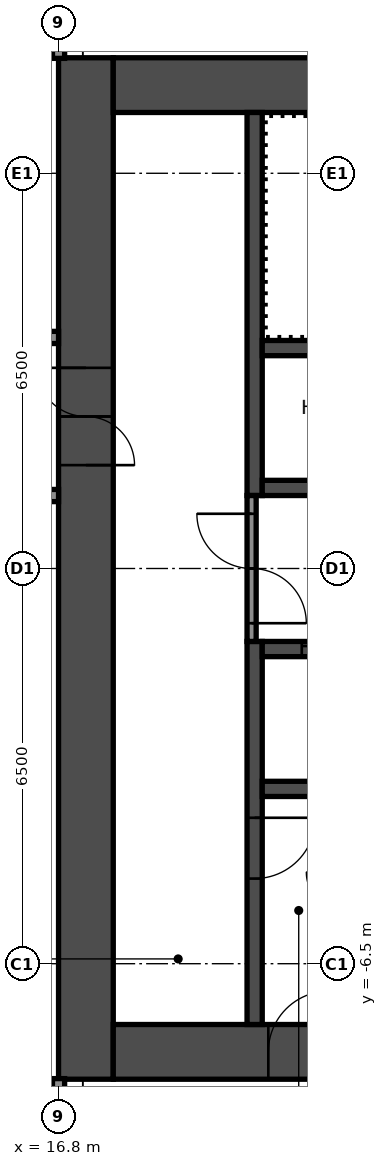
"""IFC4 building model, lengths in metres.
Left out: names, types, materials, properties, quantities, classifications, styles, units other than length and angle.
Written with IfcOpenShell. Run it as: python <this file> out.ifc"""

import sys

from ifc_helpers import new_model, si_unit, direction, frame, frame_2d, origin, place, context, subcontext, project, spatial, rectangle, extrude, element, fill, save


model = new_model("IFC4")
c1 = context("Model", 3, precision=1e-05, world=origin(), true_north=direction((0.0, 1.0)))
c2 = subcontext(c1, "Body", "Model", "MODEL_VIEW")
j1 = project(units=[si_unit("LENGTHUNIT", "METRE"), si_unit("PLANEANGLEUNIT", "RADIAN")], contexts=[c1])
p1 = place(None, origin())
s1 = spatial("IfcSite", under=j1, at=p1, CompositionType="ELEMENT")
p2 = place(p1, origin())
s2 = spatial("IfcBuilding", under=s1, at=p2, CompositionType="ELEMENT")
p3 = place(p2, frame((0.0, 0.0, 175.8)))
s3 = spatial("IfcBuildingStorey", under=s2, at=p3, CompositionType="ELEMENT", Elevation=175.8)
p4 = place(p3, frame((17.25, -8.4, 0.0), z_axis=(0.0, 0.0, 1.0), x_axis=(0.0, 1.0, 0.0)))
e1 = element("IfcWall", 1, at=p4, inside=s3, PredefinedType="SHEAR", context=c2, shape_type="SweptSolid", body=[
    extrude(rectangle(XDim=16.8, YDim=0.9, at=frame_2d((8.4, 0.0))), origin(), (0.0, 0.0, 1.0), 4.1),
])
p5 = place(p4, frame((10.1, 0.0, 0.0)))
e2 = element("IfcOpeningElement", 2, at=p5, cuts=e1, PredefinedType="OPENING", context=c2, shape_type="SweptSolid", body=[
    extrude(rectangle(XDim=1.6, YDim=2.1, at=frame_2d((0.8, 1.05))), frame((0.0, 0.46, 0.0), z_axis=(0.0, -1.0, 0.0), x_axis=(1.0, 0.0, 0.0)), (0.0, 0.0, 1.0), 0.92),
])
p6 = place(p3, frame((17.7, 7.95, 0.0), z_axis=(0.0, 0.0, 1.0), x_axis=(1.0, 0.0, 0.0)))
e3 = element("IfcWall", 3, at=p6, inside=s3, PredefinedType="SHEAR", context=c2, shape_type="SweptSolid", body=[
    extrude(rectangle(XDim=15.0, YDim=0.9, at=frame_2d((7.5, 0.0))), origin(), (0.0, 0.0, 1.0), 4.1),
])
p7 = place(p6, frame((10.4, 0.0, 0.0)))
e4 = element("IfcOpeningElement", 4, at=p7, cuts=e3, PredefinedType="OPENING", context=c2, shape_type="SweptSolid", body=[
    extrude(rectangle(XDim=1.2, YDim=2.1, at=frame_2d((0.6, 1.05))), frame((0.0, 0.46, 0.0), z_axis=(0.0, -1.0, 0.0), x_axis=(1.0, 0.0, 0.0)), (0.0, 0.0, 1.0), 0.92),
])
p8 = place(p6, frame((13.35, 0.0, 0.0)))
e5 = element("IfcOpeningElement", 5, at=p8, cuts=e3, PredefinedType="OPENING", context=c2, shape_type="SweptSolid", body=[
    extrude(rectangle(XDim=0.9, YDim=2.1, at=frame_2d((0.45, 1.05))), frame((0.0, 0.46, 0.0), z_axis=(0.0, -1.0, 0.0), x_axis=(1.0, 0.0, 0.0)), (0.0, 0.0, 1.0), 0.92),
])
p9 = place(p3, frame((17.7, -7.95, 0.0), z_axis=(0.0, 0.0, 1.0), x_axis=(1.0, 0.0, 0.0)))
e6 = element("IfcWall", 6, at=p9, inside=s3, PredefinedType="SHEAR", context=c2, shape_type="SweptSolid", body=[
    extrude(rectangle(XDim=15.0, YDim=0.9, at=frame_2d((7.5, 0.0))), origin(), (0.0, 0.0, 1.0), 4.1),
])
p10 = place(p9, frame((2.55, 0.0, 0.0)))
e7 = element("IfcOpeningElement", 7, at=p10, cuts=e6, PredefinedType="OPENING", context=c2, shape_type="SweptSolid", body=[
    extrude(rectangle(XDim=1.0, YDim=2.1, at=frame_2d((0.5, 1.05))), frame((0.0, 0.46, 0.0), z_axis=(0.0, -1.0, 0.0), x_axis=(1.0, 0.0, 0.0)), (0.0, 0.0, 1.0), 0.92),
])
p11 = place(p3, frame((20.025, 1.2, 0.0), z_axis=(0.0, 0.0, 1.0), x_axis=(0.0, 1.0, 0.0)))
e8 = element("IfcWall", 8, at=p11, inside=s3, PredefinedType="SHEAR", context=c2, shape_type="SweptSolid", body=[
    extrude(rectangle(XDim=6.3, YDim=0.25, at=frame_2d((3.15, 0.0))), origin(), (0.0, 0.0, 1.0), 4.1),
])
p12 = place(p3, frame((20.025, -7.5, 0.0), z_axis=(0.0, 0.0, 1.0), x_axis=(0.0, 1.0, 0.0)))
e9 = element("IfcWall", 9, at=p12, inside=s3, PredefinedType="SHEAR", context=c2, shape_type="SweptSolid", body=[
    extrude(rectangle(XDim=6.3, YDim=0.25, at=frame_2d((3.15, 0.0))), origin(), (0.0, 0.0, 1.0), 4.1),
])
p13 = place(p12, frame((2.4, 0.0, 0.0)))
e10 = element("IfcOpeningElement", 10, at=p13, cuts=e9, PredefinedType="OPENING", context=c2, shape_type="SweptSolid", body=[
    extrude(rectangle(XDim=1.0, YDim=2.1, at=frame_2d((0.5, 1.05))), frame((0.0, 0.135, 0.0), z_axis=(0.0, -1.0, 0.0), x_axis=(1.0, 0.0, 0.0)), (0.0, 0.0, 1.0), 0.27),
])
p14 = place(p3, frame((20.15, 1.325, 0.0), z_axis=(0.0, 0.0, 1.0), x_axis=(1.0, 0.0, 0.0)))
e11 = element("IfcWall", 11, at=p14, inside=s3, PredefinedType="SHEAR", context=c2, shape_type="SweptSolid", body=[
    extrude(rectangle(XDim=7.5, YDim=0.25, at=frame_2d((3.75, 0.0))), origin(), (0.0, 0.0, 1.0), 4.1),
])
p15 = place(p14, frame((2.038, 0.0, 0.0)))
e12 = element("IfcOpeningElement", 12, at=p15, cuts=e11, PredefinedType="OPENING", context=c2, shape_type="SweptSolid", body=[
    extrude(rectangle(XDim=0.9, YDim=2.1, at=frame_2d((0.45, 1.05))), frame((0.0, 0.135, 0.0), z_axis=(0.0, -1.0, 0.0), x_axis=(1.0, 0.0, 0.0)), (0.0, 0.0, 1.0), 0.27),
])
p16 = place(p14, frame((5.738, 0.0, 0.0)))
e13 = element("IfcOpeningElement", 13, at=p16, cuts=e11, PredefinedType="OPENING", context=c2, shape_type="SweptSolid", body=[
    extrude(rectangle(XDim=0.9, YDim=2.1, at=frame_2d((0.45, 1.05))), frame((0.0, 0.135, 0.0), z_axis=(0.0, -1.0, 0.0), x_axis=(1.0, 0.0, 0.0)), (0.0, 0.0, 1.0), 0.27),
])
p17 = place(p3, frame((20.15, 3.625, 0.0), z_axis=(0.0, 0.0, 1.0), x_axis=(1.0, 0.0, 0.0)))
e14 = element("IfcWall", 14, at=p17, inside=s3, PredefinedType="SHEAR", context=c2, shape_type="SweptSolid", body=[
    extrude(rectangle(XDim=7.5, YDim=0.25, at=frame_2d((3.75, 0.0))), origin(), (0.0, 0.0, 1.0), 4.1),
])
p18 = place(p3, frame((20.15, -1.325, 0.0), z_axis=(0.0, 0.0, 1.0), x_axis=(1.0, 0.0, 0.0)))
e15 = element("IfcWall", 15, at=p18, inside=s3, PredefinedType="SHEAR", context=c2, shape_type="SweptSolid", body=[
    extrude(rectangle(XDim=7.5, YDim=0.25, at=frame_2d((3.75, 0.0))), origin(), (0.0, 0.0, 1.0), 4.1),
])
p19 = place(p18, frame((0.65, 0.0, 0.0)))
e16 = element("IfcOpeningElement", 16, at=p19, cuts=e15, PredefinedType="OPENING", context=c2, shape_type="SweptSolid", body=[
    extrude(rectangle(XDim=1.1, YDim=2.1, at=frame_2d((0.55, 1.05))), frame((0.0, 0.135, 0.0), z_axis=(0.0, -1.0, 0.0), x_axis=(1.0, 0.0, 0.0)), (0.0, 0.0, 1.0), 0.27),
])
p20 = place(p18, frame((3.05, 0.0, 0.0)))
e17 = element("IfcOpeningElement", 17, at=p20, cuts=e15, PredefinedType="OPENING", context=c2, shape_type="SweptSolid", body=[
    extrude(rectangle(XDim=1.1, YDim=2.1, at=frame_2d((0.55, 1.05))), frame((0.0, 0.135, 0.0), z_axis=(0.0, -1.0, 0.0), x_axis=(1.0, 0.0, 0.0)), (0.0, 0.0, 1.0), 0.27),
])
p21 = place(p18, frame((5.45, 0.0, 0.0)))
e18 = element("IfcOpeningElement", 18, at=p21, cuts=e15, PredefinedType="OPENING", context=c2, shape_type="SweptSolid", body=[
    extrude(rectangle(XDim=1.1, YDim=2.1, at=frame_2d((0.55, 1.05))), frame((0.0, 0.135, 0.0), z_axis=(0.0, -1.0, 0.0), x_axis=(1.0, 0.0, 0.0)), (0.0, 0.0, 1.0), 0.27),
])
p22 = place(p3, frame((20.15, -3.625, 0.0), z_axis=(0.0, 0.0, 1.0), x_axis=(1.0, 0.0, 0.0)))
e19 = element("IfcWall", 19, at=p22, inside=s3, PredefinedType="SHEAR", context=c2, shape_type="SweptSolid", body=[
    extrude(rectangle(XDim=7.5, YDim=0.25, at=frame_2d((3.75, 0.0))), origin(), (0.0, 0.0, 1.0), 4.1),
])
p23 = place(p3, frame((19.975, -1.2, 0.0), z_axis=(0.0, 0.0, 1.0), x_axis=(0.0, 1.0, 0.0)))
e20 = element("IfcWall", 20, at=p23, inside=s3, PredefinedType="PARTITIONING", context=c2, shape_type="SweptSolid", body=[
    extrude(rectangle(XDim=2.4, YDim=0.15, at=frame_2d((1.2, 0.0))), origin(), (0.0, 0.0, 1.0), 4.1),
])
p24 = place(p23, frame((0.3, 0.0, 0.0)))
e21 = element("IfcOpeningElement", 21, at=p24, cuts=e20, PredefinedType="OPENING", context=c2, shape_type="SweptSolid", body=[
    extrude(rectangle(XDim=1.8, YDim=2.1, at=frame_2d((0.9, 1.05))), frame((0.0, 0.085, 0.0), z_axis=(0.0, -1.0, 0.0), x_axis=(1.0, 0.0, 0.0)), (0.0, 0.0, 1.0), 0.17),
])
p25 = place(p3, frame((-16.8, 1.2, 0.0), z_axis=(0.0, 0.0, 1.0), x_axis=(1.0, 0.0, 0.0)))
e22 = element("IfcWall", 22, at=p25, inside=s3, PredefinedType="PARTITIONING", context=c2, shape_type="SweptSolid", body=[
    extrude(rectangle(XDim=33.6, YDim=0.2, at=frame_2d((16.8, 0.0))), origin(), (0.0, 0.0, 1.0), 4.1),
])
p26 = place(p25, frame((3.75, 0.0, 0.0)))
e23 = element("IfcOpeningElement", 23, at=p26, cuts=e22, PredefinedType="OPENING", context=c2, shape_type="SweptSolid", body=[
    extrude(rectangle(XDim=0.9, YDim=2.1, at=frame_2d((0.45, 1.05))), frame((0.0, 0.11, 0.0), z_axis=(0.0, -1.0, 0.0), x_axis=(1.0, 0.0, 0.0)), (0.0, 0.0, 1.0), 0.22),
])
p27 = place(p25, frame((11.8, 0.0, 0.0)))
e24 = element("IfcOpeningElement", 24, at=p27, cuts=e22, PredefinedType="OPENING", context=c2, shape_type="SweptSolid", body=[
    extrude(rectangle(XDim=1.6, YDim=2.1, at=frame_2d((0.8, 1.05))), frame((0.0, 0.11, 0.0), z_axis=(0.0, -1.0, 0.0), x_axis=(1.0, 0.0, 0.0)), (0.0, 0.0, 1.0), 0.22),
])
p28 = place(p25, frame((20.55, 0.0, 0.0)))
e25 = element("IfcOpeningElement", 25, at=p28, cuts=e22, PredefinedType="OPENING", context=c2, shape_type="SweptSolid", body=[
    extrude(rectangle(XDim=0.9, YDim=2.1, at=frame_2d((0.45, 1.05))), frame((0.0, 0.11, 0.0), z_axis=(0.0, -1.0, 0.0), x_axis=(1.0, 0.0, 0.0)), (0.0, 0.0, 1.0), 0.22),
])
p29 = place(p25, frame((28.95, 0.0, 0.0)))
e26 = element("IfcOpeningElement", 26, at=p29, cuts=e22, PredefinedType="OPENING", context=c2, shape_type="SweptSolid", body=[
    extrude(rectangle(XDim=0.9, YDim=2.1, at=frame_2d((0.45, 1.05))), frame((0.0, 0.11, 0.0), z_axis=(0.0, -1.0, 0.0), x_axis=(1.0, 0.0, 0.0)), (0.0, 0.0, 1.0), 0.22),
])
p30 = place(p3, frame((-16.8, 3.8, 0.0), z_axis=(0.0, 0.0, 1.0), x_axis=(1.0, 0.0, 0.0)))
e27 = element("IfcWall", 27, at=p30, inside=s3, PredefinedType="PARTITIONING", context=c2, shape_type="SweptSolid", body=[
    extrude(rectangle(XDim=33.6, YDim=0.2, at=frame_2d((16.8, 0.0))), origin(), (0.0, 0.0, 1.0), 4.1),
])
p31 = place(p30, frame((3.75, 0.0, 0.0)))
e28 = element("IfcOpeningElement", 28, at=p31, cuts=e27, PredefinedType="OPENING", context=c2, shape_type="SweptSolid", body=[
    extrude(rectangle(XDim=0.9, YDim=2.1, at=frame_2d((0.45, 1.05))), frame((0.0, 0.11, 0.0), z_axis=(0.0, -1.0, 0.0), x_axis=(1.0, 0.0, 0.0)), (0.0, 0.0, 1.0), 0.22),
])
p32 = place(p30, frame((11.8, 0.0, 0.0)))
e29 = element("IfcOpeningElement", 29, at=p32, cuts=e27, PredefinedType="OPENING", context=c2, shape_type="SweptSolid", body=[
    extrude(rectangle(XDim=1.6, YDim=2.1, at=frame_2d((0.8, 1.05))), frame((0.0, 0.11, 0.0), z_axis=(0.0, -1.0, 0.0), x_axis=(1.0, 0.0, 0.0)), (0.0, 0.0, 1.0), 0.22),
])
p33 = place(p30, frame((20.55, 0.0, 0.0)))
e30 = element("IfcOpeningElement", 30, at=p33, cuts=e27, PredefinedType="OPENING", context=c2, shape_type="SweptSolid", body=[
    extrude(rectangle(XDim=0.9, YDim=2.1, at=frame_2d((0.45, 1.05))), frame((0.0, 0.11, 0.0), z_axis=(0.0, -1.0, 0.0), x_axis=(1.0, 0.0, 0.0)), (0.0, 0.0, 1.0), 0.22),
])
p34 = place(p30, frame((28.95, 0.0, 0.0)))
e31 = element("IfcOpeningElement", 31, at=p34, cuts=e27, PredefinedType="OPENING", context=c2, shape_type="SweptSolid", body=[
    extrude(rectangle(XDim=0.9, YDim=2.1, at=frame_2d((0.45, 1.05))), frame((0.0, 0.11, 0.0), z_axis=(0.0, -1.0, 0.0), x_axis=(1.0, 0.0, 0.0)), (0.0, 0.0, 1.0), 0.22),
])
p35 = place(p3, frame((16.8, -19.3, 0.0), z_axis=(0.0, 0.0, 1.0), x_axis=(0.0, 1.0, 0.0)))
e32 = element("IfcWall", 32, at=p35, inside=s3, PredefinedType="PARTITIONING", context=c2, shape_type="SweptSolid", body=[
    extrude(rectangle(XDim=10.91, YDim=0.2, at=frame_2d((5.455, 0.0))), origin(), (0.0, 0.0, 1.0), 4.1),
])
p36 = place(p3, frame((16.8, 8.39, 0.0), z_axis=(0.0, 0.0, 1.0), x_axis=(0.0, 1.0, 0.0)))
e33 = element("IfcWall", 33, at=p36, inside=s3, PredefinedType="PARTITIONING", context=c2, shape_type="SweptSolid", body=[
    extrude(rectangle(XDim=12.16, YDim=0.2, at=frame_2d((6.08, 0.0))), origin(), (0.0, 0.0, 1.0), 4.1),
])
p37 = place(p5, origin())
e34 = element("IfcDoor", 34, at=p37, inside=s3, OperationType="DOUBLE_DOOR_SINGLE_SWING", PredefinedType="DOOR", context=c2, shape_type="SweptSolid", body=[
    extrude(rectangle(XDim=1.6, YDim=2.1, at=frame_2d((0.8, 1.05))), frame((0.0, 0.025, 0.0), z_axis=(0.0, -1.0, 0.0), x_axis=(1.0, 0.0, 0.0)), (0.0, 0.0, 1.0), 0.05),
])
fill(e2, e34)
p38 = place(p10, origin())
e35 = element("IfcDoor", 35, at=p38, inside=s3, OperationType="SINGLE_SWING_LEFT", PredefinedType="DOOR", context=c2, shape_type="SweptSolid", body=[
    extrude(rectangle(XDim=1.0, YDim=2.1, at=frame_2d((0.5, 1.05))), frame((0.0, 0.025, 0.0), z_axis=(0.0, -1.0, 0.0), x_axis=(1.0, 0.0, 0.0)), (0.0, 0.0, 1.0), 0.05),
])
fill(e7, e35)
p39 = place(p13, origin())
e36 = element("IfcDoor", 36, at=p39, inside=s3, OperationType="SINGLE_SWING_RIGHT", PredefinedType="DOOR", context=c2, shape_type="SweptSolid", body=[
    extrude(rectangle(XDim=1.0, YDim=2.1, at=frame_2d((0.5, 1.05))), frame((0.0, 0.025, 0.0), z_axis=(0.0, -1.0, 0.0), x_axis=(1.0, 0.0, 0.0)), (0.0, 0.0, 1.0), 0.05),
])
fill(e10, e36)
p40 = place(p24, origin())
e37 = element("IfcDoor", 37, at=p40, inside=s3, OperationType="DOUBLE_DOOR_SINGLE_SWING", PredefinedType="DOOR", context=c2, shape_type="SweptSolid", body=[
    extrude(rectangle(XDim=1.8, YDim=2.1, at=frame_2d((0.9, 1.05))), frame((0.0, 0.025, 0.0), z_axis=(0.0, -1.0, 0.0), x_axis=(1.0, 0.0, 0.0)), (0.0, 0.0, 1.0), 0.05),
])
fill(e21, e37)
p41 = place(p19, origin())
e38 = element("IfcDoor", 38, at=p41, inside=s3, OperationType="DOUBLE_DOOR_SLIDING", PredefinedType="DOOR", context=c2, shape_type="SweptSolid", body=[
    extrude(rectangle(XDim=1.1, YDim=2.1, at=frame_2d((0.55, 1.05))), frame((0.0, 0.025, 0.0), z_axis=(0.0, -1.0, 0.0), x_axis=(1.0, 0.0, 0.0)), (0.0, 0.0, 1.0), 0.05),
])
fill(e16, e38)
save(model, sys.argv[1])
